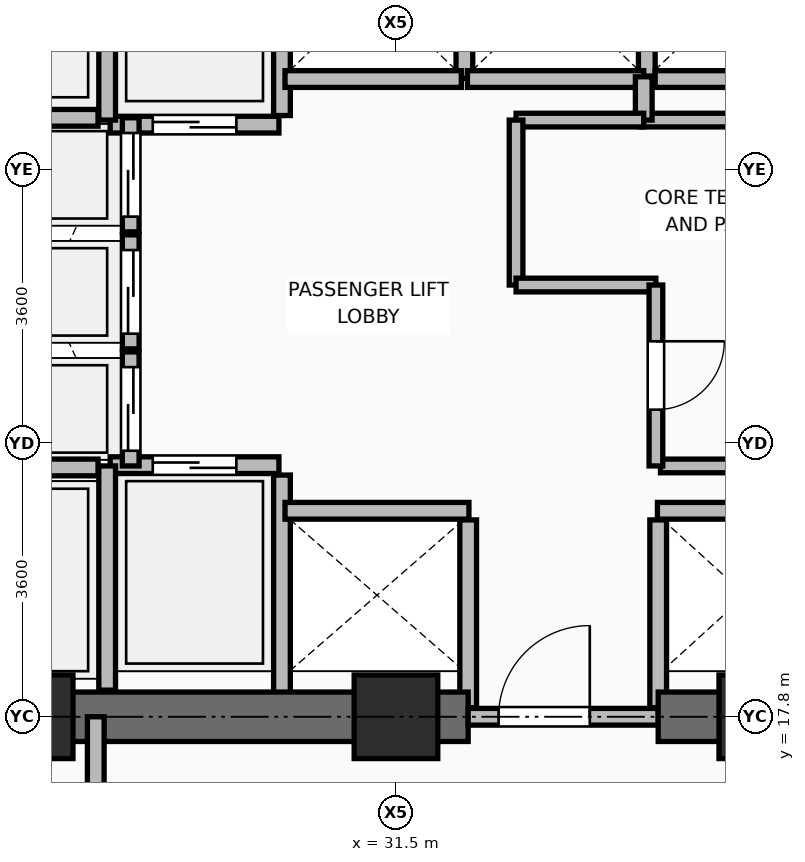
"""IFC4 building model, lengths in metres.
Left out: names, types, materials, properties, quantities, classifications, styles, units other than length and angle.
Written with IfcOpenShell. Run it as: python <this file> out.ifc"""

import sys

from ifc_helpers import new_model, si_unit, direction, frame, frame_2d, origin, origin_2d, place, context, subcontext, project, spatial, rectangle, extrude, element, fill, save


model = new_model("IFC4")
c1 = context("Model", 3, precision=1e-05, world=origin(), true_north=direction((0.0, 1.0)))
c2 = subcontext(c1, "Body", "Model", "MODEL_VIEW")
j1 = project(units=[si_unit("LENGTHUNIT", "METRE"), si_unit("PLANEANGLEUNIT", "RADIAN")], contexts=[c1])
p1 = place(None, origin())
s1 = spatial("IfcSite", under=j1, at=p1, CompositionType="ELEMENT")
p2 = place(p1, origin())
s2 = spatial("IfcBuilding", under=s1, at=p2, CompositionType="ELEMENT")
p3 = place(p2, frame((0.0, 0.0, 79.5)))
s3 = spatial("IfcBuildingStorey", under=s2, at=p3, CompositionType="ELEMENT", Elevation=79.5)
for number, where, z_axis, x_axis in (
    (1, (26.7, 17.8, 0.0), (0.0, 0.0, 1.0), (1.0, 0.0, 0.0)),
    (2, (31.5, 17.8, 0.0), (0.0, 0.0, 1.0), (1.0, 0.0, 0.0)),
    (3, (36.3, 17.8, 0.0), (0.0, 0.0, 1.0), (1.0, 0.0, 0.0)),
):
    element("IfcColumn", number, at=place(p3, frame(where, z_axis=z_axis, x_axis=x_axis)), inside=s3, PredefinedType="COLUMN", context=c2, shape_type="SweptSolid", body=[
        extrude(rectangle(XDim=1.1, YDim=1.1, at=origin_2d()), origin(), (0.0, 0.0, 1.0), 3.75),
    ])
p4 = place(p3, frame((30.0, 18.08, 0.0), z_axis=(0.0, 0.0, 1.0), x_axis=(0.0, 1.0, 0.0)))
e4 = element("IfcWall", 4, at=p4, inside=s3, PredefinedType="PARTITIONING", context=c2, shape_type="SweptSolid", body=[
    extrude(rectangle(XDim=2.9, YDim=0.22, at=frame_2d((1.45, 0.0))), origin(), (0.0, 0.0, 1.0), 3.545),
])
for number, where, z_axis, x_axis in (
    (5, (32.45, 17.92, 0.0), (0.0, 0.0, 1.0), (0.0, 1.0, 0.0)),
    (6, (34.95, 17.92, 0.0), (0.0, 0.0, 1.0), (0.0, 1.0, 0.0)),
):
    element("IfcWall", number, at=place(p3, frame(where, z_axis=z_axis, x_axis=x_axis)), inside=s3, PredefinedType="PARTITIONING", context=c2, shape_type="SweptSolid", body=[
        extrude(rectangle(XDim=2.47, YDim=0.22, at=frame_2d((1.235, 0.0))), origin(), (0.0, 0.0, 1.0), 2.928),
    ])
p5 = place(p3, frame((30.0, 25.71, 0.0), z_axis=(0.0, 0.0, 1.0), x_axis=(0.0, 1.0, 0.0)))
e7 = element("IfcWall", 7, at=p5, inside=s3, PredefinedType="PARTITIONING", context=c2, shape_type="SweptSolid", body=[
    extrude(rectangle(XDim=2.73, YDim=0.22, at=frame_2d((1.365, 0.0))), origin(), (0.0, 0.0, 1.0), 3.545),
])
p6 = place(p3, frame((32.4, 26.2, 0.0), z_axis=(0.0, 0.0, 1.0), x_axis=(0.0, 1.0, 0.0)))
e8 = element("IfcWall", 8, at=p6, inside=s3, PredefinedType="PARTITIONING", context=c2, shape_type="SweptSolid", body=[
    extrude(rectangle(XDim=2.24, YDim=0.22, at=frame_2d((1.12, 0.0))), origin(), (0.0, 0.0, 1.0), 3.545),
])
p7 = place(p3, frame((34.8, 26.23, 0.0), z_axis=(0.0, 0.0, 1.0), x_axis=(0.0, 1.0, 0.0)))
e9 = element("IfcWall", 9, at=p7, inside=s3, PredefinedType="PARTITIONING", context=c2, shape_type="SweptSolid", body=[
    extrude(rectangle(XDim=2.21, YDim=0.22, at=frame_2d((1.105, 0.0))), origin(), (0.0, 0.0, 1.0), 3.545),
])
p8 = place(p3, frame((34.91, 26.19, 0.0), z_axis=(0.0, 0.0, 1.0), x_axis=(1.0, 0.0, 0.0)))
e10 = element("IfcWall", 10, at=p8, inside=s3, PredefinedType="PARTITIONING", context=c2, shape_type="SweptSolid", body=[
    extrude(rectangle(XDim=2.14, YDim=0.22, at=frame_2d((1.07, 0.0))), origin(), (0.0, 0.0, 1.0), 3.545),
])
p9 = place(p3, frame((25.55, 17.8, 0.0), z_axis=(0.0, 0.0, 1.0), x_axis=(1.0, 0.0, 0.0)))
e11 = element("IfcWall", 11, at=p9, inside=s3, PredefinedType="SHEAR", context=c2, shape_type="SweptSolid", body=[
    extrude(rectangle(XDim=6.9, YDim=0.65, at=frame_2d((3.45, 0.0))), origin(), (0.0, 0.0, 1.0), 3.57),
])
p10 = place(p3, frame((32.45, 17.8, 0.0), z_axis=(0.0, 0.0, 1.0), x_axis=(1.0, 0.0, 0.0)))
e12 = element("IfcWall", 12, at=p10, inside=s3, PredefinedType="PARTITIONING", context=c2, shape_type="SweptSolid", body=[
    extrude(rectangle(XDim=2.5, YDim=0.22, at=frame_2d((1.25, 0.0))), origin(), (0.0, 0.0, 1.0), 2.928),
])
p11 = place(p10, frame((0.4, 0.0, 0.0)))
e13 = element("IfcOpeningElement", 13, at=p11, cuts=e12, PredefinedType="OPENING", context=c2, shape_type="SweptSolid", body=[
    extrude(rectangle(XDim=1.2, YDim=2.1, at=frame_2d((0.6, 1.05))), frame((0.0, 0.12, 0.0), z_axis=(0.0, -1.0, 0.0), x_axis=(1.0, 0.0, 0.0)), (0.0, 0.0, 1.0), 0.24),
])
p12 = place(p3, frame((34.95, 17.8, 0.0), z_axis=(0.0, 0.0, 1.0), x_axis=(1.0, 0.0, 0.0)))
e14 = element("IfcWall", 14, at=p12, inside=s3, PredefinedType="SHEAR", context=c2, shape_type="SweptSolid", body=[
    extrude(rectangle(XDim=6.475, YDim=0.65, at=frame_2d((3.238, 0.0))), origin(), (0.0, 0.0, 1.0), 3.57),
])
p13 = place(p3, frame((27.74, 21.11, 0.0), z_axis=(0.0, 0.0, 1.0), x_axis=(1.0, 0.0, 0.0)))
e15 = element("IfcWall", 15, at=p13, inside=s3, PredefinedType="PARTITIONING", context=c2, shape_type="SweptSolid", body=[
    extrude(rectangle(XDim=2.22, YDim=0.22, at=frame_2d((1.11, 0.0))), origin(), (0.0, 0.0, 1.0), 3.55),
])
p14 = place(p13, frame((0.56, 0.0, 0.0)))
e16 = element("IfcOpeningElement", 16, at=p14, cuts=e15, PredefinedType="OPENING", context=c2, shape_type="SweptSolid", body=[
    extrude(rectangle(XDim=1.1, YDim=2.2, at=frame_2d((0.55, 1.1))), frame((0.0, 0.12, 0.0), z_axis=(0.0, -1.0, 0.0), x_axis=(1.0, 0.0, 0.0)), (0.0, 0.0, 1.0), 0.24),
])
p15 = place(p3, frame((27.74, 25.59, 0.0), z_axis=(0.0, 0.0, 1.0), x_axis=(1.0, 0.0, 0.0)))
e17 = element("IfcWall", 17, at=p15, inside=s3, PredefinedType="PARTITIONING", context=c2, shape_type="SweptSolid", body=[
    extrude(rectangle(XDim=2.22, YDim=0.22, at=frame_2d((1.11, 0.0))), origin(), (0.0, 0.0, 1.0), 3.55),
])
p16 = place(p15, frame((0.56, 0.0, 0.0)))
e18 = element("IfcOpeningElement", 18, at=p16, cuts=e17, PredefinedType="OPENING", context=c2, shape_type="SweptSolid", body=[
    extrude(rectangle(XDim=1.1, YDim=2.2, at=frame_2d((0.55, 1.1))), frame((0.0, 0.12, 0.0), z_axis=(0.0, -1.0, 0.0), x_axis=(1.0, 0.0, 0.0)), (0.0, 0.0, 1.0), 0.24),
])
p17 = place(p3, frame((30.04, 20.51, 0.0), z_axis=(0.0, 0.0, 1.0), x_axis=(1.0, 0.0, 0.0)))
e19 = element("IfcWall", 19, at=p17, inside=s3, PredefinedType="PARTITIONING", context=c2, shape_type="SweptSolid", body=[
    extrude(rectangle(XDim=2.42, YDim=0.22, at=frame_2d((1.21, 0.0))), origin(), (0.0, 0.0, 1.0), 3.55),
])
p18 = place(p3, frame((34.94, 20.51, 0.0), z_axis=(0.0, 0.0, 1.0), x_axis=(1.0, 0.0, 0.0)))
e20 = element("IfcWall", 20, at=p18, inside=s3, PredefinedType="PARTITIONING", context=c2, shape_type="SweptSolid", body=[
    extrude(rectangle(XDim=2.24, YDim=0.22, at=frame_2d((1.12, 0.0))), origin(), (0.0, 0.0, 1.0), 3.55),
])
for number, where, z_axis, x_axis in (
    (21, (30.04, 26.19, 0.0), (0.0, 0.0, 1.0), (1.0, 0.0, 0.0)),
    (22, (32.44, 26.19, 0.0), (0.0, 0.0, 1.0), (1.0, 0.0, 0.0)),
):
    element("IfcWall", number, at=place(p3, frame(where, z_axis=z_axis, x_axis=x_axis)), inside=s3, PredefinedType="PARTITIONING", context=c2, shape_type="SweptSolid", body=[
        extrude(rectangle(XDim=2.32, YDim=0.22, at=frame_2d((1.16, 0.0))), origin(), (0.0, 0.0, 1.0), 3.55),
    ])
p19 = place(p3, frame((28.01, 21.1, 0.0), z_axis=(0.0, 0.0, 1.0), x_axis=(0.0, 1.0, 0.0)))
e23 = element("IfcWall", 23, at=p19, inside=s3, PredefinedType="PARTITIONING", context=c2, shape_type="SweptSolid", body=[
    extrude(rectangle(XDim=1.5, YDim=0.22, at=frame_2d((0.75, 0.0))), origin(), (0.0, 0.0, 1.0), 3.55),
])
p20 = place(p19, frame((0.2, 0.0, 0.0)))
e24 = element("IfcOpeningElement", 24, at=p20, cuts=e23, PredefinedType="OPENING", context=c2, shape_type="SweptSolid", body=[
    extrude(rectangle(XDim=1.1, YDim=2.2, at=frame_2d((0.55, 1.1))), frame((0.0, 0.12, 0.0), z_axis=(0.0, -1.0, 0.0), x_axis=(1.0, 0.0, 0.0)), (0.0, 0.0, 1.0), 0.24),
])
p21 = place(p3, frame((28.01, 22.64, 0.0), z_axis=(0.0, 0.0, 1.0), x_axis=(0.0, 1.0, 0.0)))
e25 = element("IfcWall", 25, at=p21, inside=s3, PredefinedType="PARTITIONING", context=c2, shape_type="SweptSolid", body=[
    extrude(rectangle(XDim=1.5, YDim=0.22, at=frame_2d((0.75, 0.0))), origin(), (0.0, 0.0, 1.0), 3.55),
])
p22 = place(p21, frame((0.2, 0.0, 0.0)))
e26 = element("IfcOpeningElement", 26, at=p22, cuts=e25, PredefinedType="OPENING", context=c2, shape_type="SweptSolid", body=[
    extrude(rectangle(XDim=1.1, YDim=2.2, at=frame_2d((0.55, 1.1))), frame((0.0, 0.12, 0.0), z_axis=(0.0, -1.0, 0.0), x_axis=(1.0, 0.0, 0.0)), (0.0, 0.0, 1.0), 0.24),
])
p23 = place(p3, frame((28.01, 24.18, 0.0), z_axis=(0.0, 0.0, 1.0), x_axis=(0.0, 1.0, 0.0)))
e27 = element("IfcWall", 27, at=p23, inside=s3, PredefinedType="PARTITIONING", context=c2, shape_type="SweptSolid", body=[
    extrude(rectangle(XDim=1.5, YDim=0.22, at=frame_2d((0.75, 0.0))), origin(), (0.0, 0.0, 1.0), 3.55),
])
p24 = place(p23, frame((0.2, 0.0, 0.0)))
e28 = element("IfcOpeningElement", 28, at=p24, cuts=e27, PredefinedType="OPENING", context=c2, shape_type="SweptSolid", body=[
    extrude(rectangle(XDim=1.1, YDim=2.2, at=frame_2d((0.55, 1.1))), frame((0.0, 0.12, 0.0), z_axis=(0.0, -1.0, 0.0), x_axis=(1.0, 0.0, 0.0)), (0.0, 0.0, 1.0), 0.24),
])
p25 = place(p3, frame((27.7, 18.15, 0.0), z_axis=(0.0, 0.0, 1.0), x_axis=(0.0, 1.0, 0.0)))
e29 = element("IfcWall", 29, at=p25, inside=s3, PredefinedType="PARTITIONING", context=c2, shape_type="SweptSolid", body=[
    extrude(rectangle(XDim=2.95, YDim=0.22, at=frame_2d((1.475, 0.0))), origin(), (0.0, 0.0, 1.0), 3.55),
])
p26 = place(p3, frame((27.7, 25.65, 0.0), z_axis=(0.0, 0.0, 1.0), x_axis=(0.0, 1.0, 0.0)))
e30 = element("IfcWall", 30, at=p26, inside=s3, PredefinedType="PARTITIONING", context=c2, shape_type="SweptSolid", body=[
    extrude(rectangle(XDim=3.0, YDim=0.22, at=frame_2d((1.5, 0.0))), origin(), (0.0, 0.0, 1.0), 3.55),
])
for number, where, z_axis, x_axis in (
    (31, (25.88, 21.08, 0.0), (0.0, 0.0, 1.0), (1.0, 0.0, 0.0)),
    (32, (25.88, 25.68, 0.0), (0.0, 0.0, 1.0), (1.0, 0.0, 0.0)),
):
    element("IfcWall", number, at=place(p3, frame(where, z_axis=z_axis, x_axis=x_axis)), inside=s3, PredefinedType="PARTITIONING", context=c2, shape_type="SweptSolid", body=[
        extrude(rectangle(XDim=1.7, YDim=0.22, at=frame_2d((0.85, 0.0))), origin(), (0.0, 0.0, 1.0), 3.55),
    ])
p27 = place(p3, frame((34.98, 21.1, 0.0), z_axis=(0.0, 0.0, 1.0), x_axis=(1.0, 0.0, 0.0)))
e33 = element("IfcWall", 33, at=p27, inside=s3, PredefinedType="PARTITIONING", context=c2, shape_type="SweptSolid", body=[
    extrude(rectangle(XDim=2.08, YDim=0.18, at=frame_2d((1.04, 0.0))), origin(), (0.0, 0.0, 1.0), 3.55),
])
p28 = place(p3, frame((34.72, 25.65, 0.0), z_axis=(0.0, 0.0, 1.0), x_axis=(1.0, 0.0, 0.0)))
e34 = element("IfcWall", 34, at=p28, inside=s3, PredefinedType="PARTITIONING", context=c2, shape_type="SweptSolid", body=[
    extrude(rectangle(XDim=2.34, YDim=0.18, at=frame_2d((1.17, 0.0))), origin(), (0.0, 0.0, 1.0), 3.55),
])
p29 = place(p3, frame((34.76, 25.65, 0.0), z_axis=(0.0, 0.0, 1.0), x_axis=(0.0, 1.0, 0.0)))
e35 = element("IfcWall", 35, at=p29, inside=s3, PredefinedType="PARTITIONING", context=c2, shape_type="SweptSolid", body=[
    extrude(rectangle(XDim=0.57, YDim=0.22, at=frame_2d((0.285, 0.0))), origin(), (0.0, 0.0, 1.0), 3.55),
])
p30 = place(p3, frame((33.08, 25.65, 0.0), z_axis=(0.0, 0.0, 1.0), x_axis=(1.0, 0.0, 0.0)))
e36 = element("IfcWall", 36, at=p30, inside=s3, PredefinedType="PARTITIONING", context=c2, shape_type="SweptSolid", body=[
    extrude(rectangle(XDim=1.68, YDim=0.18, at=frame_2d((0.84, 0.0))), origin(), (0.0, 0.0, 1.0), 3.55),
])
p31 = place(p3, frame((33.08, 23.48, 0.0), z_axis=(0.0, 0.0, 1.0), x_axis=(0.0, 1.0, 0.0)))
e37 = element("IfcWall", 37, at=p31, inside=s3, PredefinedType="PARTITIONING", context=c2, shape_type="SweptSolid", body=[
    extrude(rectangle(XDim=2.17, YDim=0.18, at=frame_2d((1.085, 0.0))), origin(), (0.0, 0.0, 1.0), 3.55),
])
p32 = place(p3, frame((33.08, 23.48, 0.0), z_axis=(0.0, 0.0, 1.0), x_axis=(1.0, 0.0, 0.0)))
e38 = element("IfcWall", 38, at=p32, inside=s3, PredefinedType="PARTITIONING", context=c2, shape_type="SweptSolid", body=[
    extrude(rectangle(XDim=1.84, YDim=0.18, at=frame_2d((0.92, 0.0))), origin(), (0.0, 0.0, 1.0), 3.55),
])
p33 = place(p3, frame((34.92, 21.1, 0.0), z_axis=(0.0, 0.0, 1.0), x_axis=(0.0, 1.0, 0.0)))
e39 = element("IfcWall", 39, at=p33, inside=s3, PredefinedType="PARTITIONING", context=c2, shape_type="SweptSolid", body=[
    extrude(rectangle(XDim=2.38, YDim=0.18, at=frame_2d((1.19, 0.0))), origin(), (0.0, 0.0, 1.0), 3.55),
])
p34 = place(p33, frame((0.74, 0.0, 0.0)))
e40 = element("IfcOpeningElement", 40, at=p34, cuts=e39, PredefinedType="OPENING", context=c2, shape_type="SweptSolid", body=[
    extrude(rectangle(XDim=0.9, YDim=2.1, at=frame_2d((0.45, 1.05))), frame((0.0, 0.1, 0.0), z_axis=(0.0, -1.0, 0.0), x_axis=(1.0, 0.0, 0.0)), (0.0, 0.0, 1.0), 0.2),
])
p35 = place(p3, frame((27.55, 14.35, 0.0), z_axis=(0.0, 0.0, 1.0), x_axis=(0.0, 1.0, 0.0)))
e41 = element("IfcWall", 41, at=p35, inside=s3, PredefinedType="PARTITIONING", context=c2, shape_type="SweptSolid", body=[
    extrude(rectangle(XDim=3.45, YDim=0.22, at=frame_2d((1.725, 0.0))), origin(), (0.0, 0.0, 1.0), 2.928),
])
p36 = place(p35, frame((1.175, 0.0, 0.0)))
e42 = element("IfcOpeningElement", 42, at=p36, cuts=e41, PredefinedType="OPENING", context=c2, shape_type="SweptSolid", body=[
    extrude(rectangle(XDim=1.1, YDim=2.1, at=frame_2d((0.55, 1.05))), frame((0.0, 0.12, 0.0), z_axis=(0.0, -1.0, 0.0), x_axis=(1.0, 0.0, 0.0)), (0.0, 0.0, 1.0), 0.24),
])
p37 = place(p11, origin())
e43 = element("IfcDoor", 43, at=p37, inside=s3, OperationType="SINGLE_SWING_RIGHT", PredefinedType="DOOR", context=c2, shape_type="SweptSolid", body=[
    extrude(rectangle(XDim=1.2, YDim=2.1, at=frame_2d((0.6, 1.05))), frame((0.0, 0.025, 0.0), z_axis=(0.0, -1.0, 0.0), x_axis=(1.0, 0.0, 0.0)), (0.0, 0.0, 1.0), 0.05),
])
fill(e13, e43)
p38 = place(p14, origin())
e44 = element("IfcDoor", 44, at=p38, inside=s3, OperationType="DOUBLE_DOOR_SLIDING", PredefinedType="DOOR", context=c2, shape_type="SweptSolid", body=[
    extrude(rectangle(XDim=1.1, YDim=2.2, at=frame_2d((0.55, 1.1))), frame((0.0, 0.025, 0.0), z_axis=(0.0, -1.0, 0.0), x_axis=(1.0, 0.0, 0.0)), (0.0, 0.0, 1.0), 0.05),
])
fill(e16, e44)
p39 = place(p16, frame((1.1, 0.0, 0.0), z_axis=(0.0, 0.0, 1.0), x_axis=(-1.0, 0.0, 0.0)))
e45 = element("IfcDoor", 45, at=p39, inside=s3, OperationType="DOUBLE_DOOR_SLIDING", PredefinedType="DOOR", context=c2, shape_type="SweptSolid", body=[
    extrude(rectangle(XDim=1.1, YDim=2.2, at=frame_2d((0.55, 1.1))), frame((0.0, 0.025, 0.0), z_axis=(0.0, -1.0, 0.0), x_axis=(1.0, 0.0, 0.0)), (0.0, 0.0, 1.0), 0.05),
])
fill(e18, e45)
p40 = place(p20, frame((1.1, 0.0, 0.0), z_axis=(0.0, 0.0, 1.0), x_axis=(-1.0, 0.0, 0.0)))
e46 = element("IfcDoor", 46, at=p40, inside=s3, OperationType="DOUBLE_DOOR_SLIDING", PredefinedType="DOOR", context=c2, shape_type="SweptSolid", body=[
    extrude(rectangle(XDim=1.1, YDim=2.2, at=frame_2d((0.55, 1.1))), frame((0.0, 0.025, 0.0), z_axis=(0.0, -1.0, 0.0), x_axis=(1.0, 0.0, 0.0)), (0.0, 0.0, 1.0), 0.05),
])
fill(e24, e46)
p41 = place(p22, frame((1.1, 0.0, 0.0), z_axis=(0.0, 0.0, 1.0), x_axis=(-1.0, 0.0, 0.0)))
e47 = element("IfcDoor", 47, at=p41, inside=s3, OperationType="DOUBLE_DOOR_SLIDING", PredefinedType="DOOR", context=c2, shape_type="SweptSolid", body=[
    extrude(rectangle(XDim=1.1, YDim=2.2, at=frame_2d((0.55, 1.1))), frame((0.0, 0.025, 0.0), z_axis=(0.0, -1.0, 0.0), x_axis=(1.0, 0.0, 0.0)), (0.0, 0.0, 1.0), 0.05),
])
fill(e26, e47)
p42 = place(p24, frame((1.1, 0.0, 0.0), z_axis=(0.0, 0.0, 1.0), x_axis=(-1.0, 0.0, 0.0)))
e48 = element("IfcDoor", 48, at=p42, inside=s3, OperationType="DOUBLE_DOOR_SLIDING", PredefinedType="DOOR", context=c2, shape_type="SweptSolid", body=[
    extrude(rectangle(XDim=1.1, YDim=2.2, at=frame_2d((0.55, 1.1))), frame((0.0, 0.025, 0.0), z_axis=(0.0, -1.0, 0.0), x_axis=(1.0, 0.0, 0.0)), (0.0, 0.0, 1.0), 0.05),
])
fill(e28, e48)
p43 = place(p34, frame((0.9, 0.0, 0.0), z_axis=(0.0, 0.0, 1.0), x_axis=(-1.0, 0.0, 0.0)))
e49 = element("IfcDoor", 49, at=p43, inside=s3, OperationType="SINGLE_SWING_LEFT", PredefinedType="DOOR", context=c2, shape_type="SweptSolid", body=[
    extrude(rectangle(XDim=0.9, YDim=2.1, at=frame_2d((0.45, 1.05))), frame((0.0, 0.025, 0.0), z_axis=(0.0, -1.0, 0.0), x_axis=(1.0, 0.0, 0.0)), (0.0, 0.0, 1.0), 0.05),
])
fill(e40, e49)
save(model, sys.argv[1])
